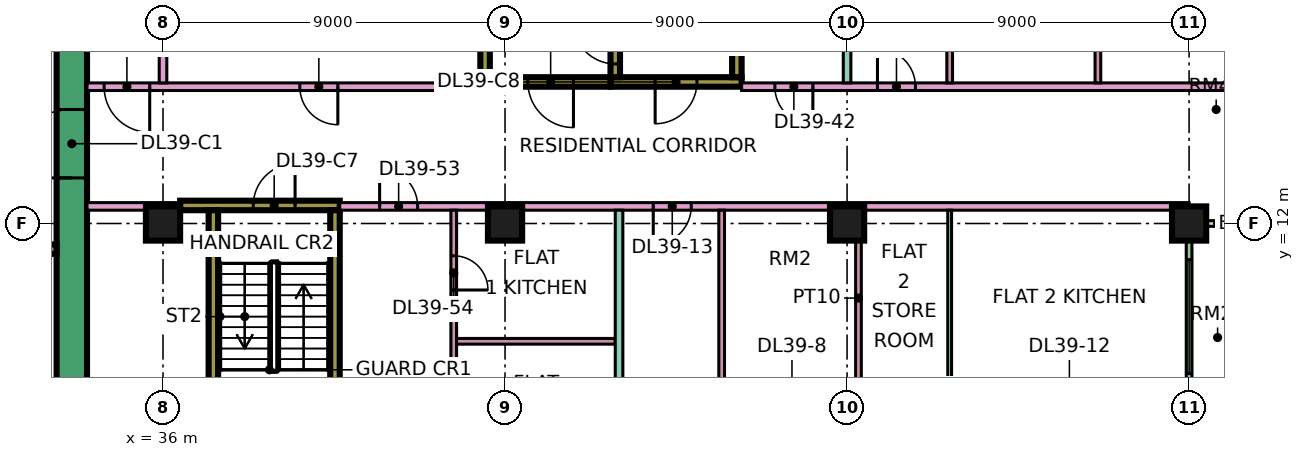
"""IFC4 building model, lengths in metres.
Left out: names, types, materials, properties, quantities, classifications, styles, units other than length and angle.
Written with IfcOpenShell. Run it as: python <this file> out.ifc"""

import sys

from ifc_helpers import new_model, si_unit, direction, frame, frame_2d, origin, origin_2d, place, context, subcontext, project, spatial, rectangle, extrude, element, fill, save


model = new_model("IFC4")
c1 = context("Model", 3, precision=1e-05, world=origin(), true_north=direction((0.0, 1.0)))
c2 = subcontext(c1, "Body", "Model", "MODEL_VIEW")
j1 = project(units=[si_unit("LENGTHUNIT", "METRE"), si_unit("PLANEANGLEUNIT", "RADIAN")], contexts=[c1])
p1 = place(None, origin())
s1 = spatial("IfcSite", under=j1, at=p1, CompositionType="ELEMENT")
p2 = place(p1, origin())
s2 = spatial("IfcBuilding", under=s1, at=p2, CompositionType="ELEMENT")
p3 = place(p2, frame((0.0, 0.0, 172.4)))
s3 = spatial("IfcBuildingStorey", under=s2, at=p3, CompositionType="ELEMENT", Elevation=172.4)
for number, where, z_axis, x_axis in (
    (1, (36.0, 12.0, 0.0), (0.0, 0.0, 1.0), (1.0, 0.0, 0.0)),
    (2, (45.0, 12.0, 0.0), (0.0, 0.0, 1.0), (1.0, 0.0, 0.0)),
    (3, (54.0, 12.0, 0.0), (0.0, 0.0, 1.0), (1.0, 0.0, 0.0)),
    (4, (63.0, 12.0, 0.0), (0.0, 0.0, 1.0), (1.0, 0.0, 0.0)),
):
    element("IfcColumn", number, at=place(p3, frame(where, z_axis=z_axis, x_axis=x_axis)), inside=s3, PredefinedType="COLUMN", context=c2, shape_type="SweptSolid", body=[
        extrude(rectangle(XDim=0.9, YDim=0.9, at=origin_2d()), origin(), (0.0, 0.0, 1.0), 3.75),
    ])
p4 = place(p3, frame((33.6, 7.8, 0.0), z_axis=(0.0, 0.0, 1.0), x_axis=(0.0, 1.0, 0.0)))
e5 = element("IfcWall", 5, at=p4, inside=s3, PredefinedType="SHEAR", context=c2, shape_type="SweptSolid", body=[
    extrude(rectangle(XDim=11.4, YDim=0.8, at=frame_2d((5.7, 0.0))), origin(), (0.0, 0.0, 1.0), 3.75),
])
p5 = place(p4, frame((5.4, 0.0, 0.0)))
e6 = element("IfcOpeningElement", 6, at=p5, cuts=e5, PredefinedType="OPENING", context=c2, shape_type="SweptSolid", body=[
    extrude(rectangle(XDim=1.8, YDim=2.4, at=frame_2d((0.9, 1.2))), frame((0.0, 0.41, 0.0), z_axis=(0.0, -1.0, 0.0), x_axis=(1.0, 0.0, 0.0)), (0.0, 0.0, 1.0), 0.82),
])
p6 = place(p3, frame((13.45, 11.325, 0.0), z_axis=(0.0, 0.0, 1.0), x_axis=(1.0, 0.0, 0.0)))
e7 = element("IfcWall", 7, at=p6, inside=s3, PredefinedType="SHEAR", context=c2, shape_type="SweptSolid", body=[
    extrude(rectangle(XDim=19.75, YDim=0.25, at=frame_2d((9.875, 0.0))), origin(), (0.0, 0.0, 1.0), 3.75),
])
p7 = place(p6, frame((11.65, 0.0, 0.0)))
e8 = element("IfcOpeningElement", 8, at=p7, cuts=e7, PredefinedType="OPENING", context=c2, shape_type="SweptSolid", body=[
    extrude(rectangle(XDim=1.2, YDim=2.2, at=frame_2d((0.6, 1.1))), frame((0.0, 0.135, 0.0), z_axis=(0.0, -1.0, 0.0), x_axis=(1.0, 0.0, 0.0)), (0.0, 0.0, 1.0), 0.27),
])
p8 = place(p6, frame((14.4, 0.0, 0.0)))
e9 = element("IfcOpeningElement", 9, at=p8, cuts=e7, PredefinedType="OPENING", context=c2, shape_type="SweptSolid", body=[
    extrude(rectangle(XDim=1.2, YDim=2.2, at=frame_2d((0.6, 1.1))), frame((0.0, 0.135, 0.0), z_axis=(0.0, -1.0, 0.0), x_axis=(1.0, 0.0, 0.0)), (0.0, 0.0, 1.0), 0.27),
])
p9 = place(p6, frame((17.15, 0.0, 0.0)))
e10 = element("IfcOpeningElement", 10, at=p9, cuts=e7, PredefinedType="OPENING", context=c2, shape_type="SweptSolid", body=[
    extrude(rectangle(XDim=1.2, YDim=2.2, at=frame_2d((0.6, 1.1))), frame((0.0, 0.135, 0.0), z_axis=(0.0, -1.0, 0.0), x_axis=(1.0, 0.0, 0.0)), (0.0, 0.0, 1.0), 0.27),
])
p10 = place(p6, frame((2.8, 0.0, 0.0)))
e11 = element("IfcOpeningElement", 11, at=p10, cuts=e7, PredefinedType="OPENING", context=c2, shape_type="SweptSolid", body=[
    extrude(rectangle(XDim=0.9, YDim=2.1, at=frame_2d((0.45, 1.05))), frame((0.0, 0.135, 0.0), z_axis=(0.0, -1.0, 0.0), x_axis=(1.0, 0.0, 0.0)), (0.0, 0.0, 1.0), 0.27),
])
p11 = place(p6, frame((8.175, 0.0, 0.0)))
e12 = element("IfcOpeningElement", 12, at=p11, cuts=e7, PredefinedType="OPENING", context=c2, shape_type="SweptSolid", body=[
    extrude(rectangle(XDim=0.9, YDim=2.1, at=frame_2d((0.45, 1.05))), frame((0.0, 0.135, 0.0), z_axis=(0.0, -1.0, 0.0), x_axis=(1.0, 0.0, 0.0)), (0.0, 0.0, 1.0), 0.27),
])
p12 = place(p3, frame((36.45, 12.475, 0.0), z_axis=(0.0, 0.0, 1.0), x_axis=(1.0, 0.0, 0.0)))
e13 = element("IfcWall", 13, at=p12, inside=s3, PredefinedType="SHEAR", context=c2, shape_type="SweptSolid", body=[
    extrude(rectangle(XDim=4.2, YDim=0.25, at=frame_2d((2.1, 0.0))), origin(), (0.0, 0.0, 1.0), 3.75),
])
p13 = place(p12, frame((1.925, 0.0, 0.0)))
e14 = element("IfcOpeningElement", 14, at=p13, cuts=e13, PredefinedType="OPENING", context=c2, shape_type="SweptSolid", body=[
    extrude(rectangle(XDim=1.1, YDim=2.2, at=frame_2d((0.55, 1.1))), frame((0.0, 0.135, 0.0), z_axis=(0.0, -1.0, 0.0), x_axis=(1.0, 0.0, 0.0)), (0.0, 0.0, 1.0), 0.27),
])
for number, where, z_axis, x_axis in (
    (15, (37.325, 5.85, 0.0), (0.0, 0.0, 1.0), (0.0, 1.0, 0.0)),
    (16, (40.525, 5.85, 0.0), (0.0, 0.0, 1.0), (0.0, 1.0, 0.0)),
):
    element("IfcWall", number, at=place(p3, frame(where, z_axis=z_axis, x_axis=x_axis)), inside=s3, PredefinedType="SHEAR", context=c2, shape_type="SweptSolid", body=[
        extrude(rectangle(XDim=6.5, YDim=0.25, at=frame_2d((3.25, 0.0))), origin(), (0.0, 0.0, 1.0), 3.75),
    ])
p14 = place(p3, frame((47.775, 15.725, 0.0), z_axis=(0.0, 0.0, 1.0), x_axis=(1.0, 0.0, 0.0)))
e17 = element("IfcWall", 17, at=p14, inside=s3, PredefinedType="SHEAR", context=c2, shape_type="SweptSolid", body=[
    extrude(rectangle(XDim=3.45, YDim=0.25, at=frame_2d((1.725, 0.0))), origin(), (0.0, 0.0, 1.0), 3.75),
])
p15 = place(p14, frame((1.175, 0.0, 0.0)))
e18 = element("IfcOpeningElement", 18, at=p15, cuts=e17, PredefinedType="OPENING", context=c2, shape_type="SweptSolid", body=[
    extrude(rectangle(XDim=1.1, YDim=2.2, at=frame_2d((0.55, 1.1))), frame((0.0, 0.135, 0.0), z_axis=(0.0, -1.0, 0.0), x_axis=(1.0, 0.0, 0.0)), (0.0, 0.0, 1.0), 0.27),
])
p16 = place(p3, frame((47.9, 15.85, 0.0), z_axis=(0.0, 0.0, 1.0), x_axis=(0.0, 1.0, 0.0)))
e19 = element("IfcWall", 19, at=p16, inside=s3, PredefinedType="SHEAR", context=c2, shape_type="SweptSolid", body=[
    extrude(rectangle(XDim=6.5, YDim=0.25, at=frame_2d((3.25, 0.0))), origin(), (0.0, 0.0, 1.0), 3.75),
])
p17 = place(p16, frame((0.35, 0.0, 0.0)))
e20 = element("IfcOpeningElement", 20, at=p17, cuts=e19, PredefinedType="OPENING", context=c2, shape_type="SweptSolid", body=[
    extrude(rectangle(XDim=1.1, YDim=2.2, at=frame_2d((0.55, 1.1))), frame((0.0, 0.135, 0.0), z_axis=(0.0, -1.0, 0.0), x_axis=(1.0, 0.0, 0.0)), (0.0, 0.0, 1.0), 0.27),
])
p18 = place(p3, frame((51.1, 15.85, 0.0), z_axis=(0.0, 0.0, 1.0), x_axis=(0.0, 1.0, 0.0)))
e21 = element("IfcWall", 21, at=p18, inside=s3, PredefinedType="SHEAR", context=c2, shape_type="SweptSolid", body=[
    extrude(rectangle(XDim=6.5, YDim=0.25, at=frame_2d((3.25, 0.0))), origin(), (0.0, 0.0, 1.0), 3.75),
])
p19 = place(p3, frame((44.35, 15.725, 0.0), z_axis=(0.0, 0.0, 1.0), x_axis=(1.0, 0.0, 0.0)))
e22 = element("IfcWall", 22, at=p19, inside=s3, PredefinedType="SHEAR", context=c2, shape_type="SweptSolid", body=[
    extrude(rectangle(XDim=3.425, YDim=0.25, at=frame_2d((1.712, 0.0))), origin(), (0.0, 0.0, 1.0), 3.75),
])
p20 = place(p19, frame((1.25, 0.0, 0.0)))
e23 = element("IfcOpeningElement", 23, at=p20, cuts=e22, PredefinedType="OPENING", context=c2, shape_type="SweptSolid", body=[
    extrude(rectangle(XDim=1.2, YDim=2.2, at=frame_2d((0.6, 1.1))), frame((0.0, 0.135, 0.0), z_axis=(0.0, -1.0, 0.0), x_axis=(1.0, 0.0, 0.0)), (0.0, 0.0, 1.0), 0.27),
])
p21 = place(p3, frame((44.475, 15.85, 0.0), z_axis=(0.0, 0.0, 1.0), x_axis=(0.0, 1.0, 0.0)))
e24 = element("IfcWall", 24, at=p21, inside=s3, PredefinedType="SHEAR", context=c2, shape_type="SweptSolid", body=[
    extrude(rectangle(XDim=6.5, YDim=0.25, at=frame_2d((3.25, 0.0))), origin(), (0.0, 0.0, 1.0), 3.75),
])
p22 = place(p21, frame((1.75, 0.0, 0.0)))
e25 = element("IfcOpeningElement", 25, at=p22, cuts=e24, PredefinedType="OPENING", context=c2, shape_type="SweptSolid", body=[
    extrude(rectangle(XDim=1.1, YDim=2.2, at=frame_2d((0.55, 1.1))), frame((0.0, 0.135, 0.0), z_axis=(0.0, -1.0, 0.0), x_axis=(1.0, 0.0, 0.0)), (0.0, 0.0, 1.0), 0.27),
])
p23 = place(p21, frame((4.3, 0.0, 0.0)))
e26 = element("IfcOpeningElement", 26, at=p23, cuts=e24, PredefinedType="OPENING", context=c2, shape_type="SweptSolid", body=[
    extrude(rectangle(XDim=1.1, YDim=2.2, at=frame_2d((0.55, 1.1))), frame((0.0, 0.135, 0.0), z_axis=(0.0, -1.0, 0.0), x_axis=(1.0, 0.0, 0.0)), (0.0, 0.0, 1.0), 0.27),
])
p24 = place(p3, frame((63.0, 1.575, 0.0), z_axis=(0.0, 0.0, 1.0), x_axis=(0.0, 1.0, 0.0)))
e27 = element("IfcWall", 27, at=p24, inside=s3, PredefinedType="SOLIDWALL", context=c2, shape_type="SweptSolid", body=[
    extrude(rectangle(XDim=10.35, YDim=0.15, at=frame_2d((5.175, 0.0))), origin(), (0.0, 0.0, 1.0), 3.35),
])
p25 = place(p24, frame((2.137, 0.0, 0.0)))
e28 = element("IfcOpeningElement", 28, at=p25, cuts=e27, PredefinedType="OPENING", context=c2, shape_type="SweptSolid", body=[
    extrude(rectangle(XDim=1.8, YDim=2.4, at=frame_2d((0.9, 1.2))), frame((0.0, 0.085, 0.0), z_axis=(0.0, -1.0, 0.0), x_axis=(1.0, 0.0, 0.0)), (0.0, 0.0, 1.0), 0.17),
])
p26 = place(p24, frame((6.475, 0.0, 0.45)))
e29 = element("IfcOpeningElement", 29, at=p26, cuts=e27, PredefinedType="OPENING", context=c2, shape_type="SweptSolid", body=[
    extrude(rectangle(XDim=3.0, YDim=2.4, at=frame_2d((1.5, 1.2))), frame((0.0, 0.085, 0.0), z_axis=(0.0, -1.0, 0.0), x_axis=(1.0, 0.0, 0.0)), (0.0, 0.0, 1.0), 0.17),
])
p27 = place(p3, frame((64.5, 12.0, 0.0), z_axis=(0.0, 0.0, 1.0), x_axis=(-1.0, 0.0, 0.0)))
e30 = element("IfcWall", 30, at=p27, inside=s3, PredefinedType="SOLIDWALL", context=c2, shape_type="SweptSolid", body=[
    extrude(rectangle(XDim=1.5, YDim=0.15, at=frame_2d((0.75, 0.0))), origin(), (0.0, 0.0, 1.0), 3.35),
])
p28 = place(p3, frame((34.0, 12.45, 0.0), z_axis=(0.0, 0.0, 1.0), x_axis=(1.0, 0.0, 0.0)))
e31 = element("IfcWall", 31, at=p28, inside=s3, PredefinedType="PARTITIONING", context=c2, shape_type="SweptSolid", body=[
    extrude(rectangle(XDim=2.451, YDim=0.2, at=frame_2d((1.226, 0.0))), origin(), (0.0, 0.0, 1.0), 3.35),
])
p29 = place(p3, frame((34.0, 15.6, 0.0), z_axis=(0.0, 0.0, 1.0), x_axis=(1.0, 0.0, 0.0)))
e32 = element("IfcWall", 32, at=p29, inside=s3, PredefinedType="PARTITIONING", context=c2, shape_type="SweptSolid", body=[
    extrude(rectangle(XDim=10.35, YDim=0.2, at=frame_2d((5.175, 0.0))), origin(), (0.0, 0.0, 1.0), 3.35),
])
p30 = place(p29, frame((5.6, 0.0, 0.0)))
e33 = element("IfcOpeningElement", 33, at=p30, cuts=e32, PredefinedType="OPENING", context=c2, shape_type="SweptSolid", body=[
    extrude(rectangle(XDim=1.0, YDim=2.1, at=frame_2d((0.5, 1.05))), frame((0.0, 0.11, 0.0), z_axis=(0.0, -1.0, 0.0), x_axis=(1.0, 0.0, 0.0)), (0.0, 0.0, 1.0), 0.22),
])
p31 = place(p29, frame((0.45, 0.0, 0.0)))
e34 = element("IfcOpeningElement", 34, at=p31, cuts=e32, PredefinedType="OPENING", context=c2, shape_type="SweptSolid", body=[
    extrude(rectangle(XDim=1.2, YDim=2.1, at=frame_2d((0.6, 1.05))), frame((0.0, 0.11, 0.0), z_axis=(0.0, -1.0, 0.0), x_axis=(1.0, 0.0, 0.0)), (0.0, 0.0, 1.0), 0.22),
])
p32 = place(p3, frame((36.0, 15.7, 0.0), z_axis=(0.0, 0.0, 1.0), x_axis=(0.0, 1.0, 0.0)))
e35 = element("IfcWall", 35, at=p32, inside=s3, PredefinedType="PARTITIONING", context=c2, shape_type="SweptSolid", body=[
    extrude(rectangle(XDim=8.3, YDim=0.2, at=frame_2d((4.15, 0.0))), origin(), (0.0, 0.0, 1.0), 3.35),
])
p33 = place(p3, frame((40.65, 12.45, 0.0), z_axis=(0.0, 0.0, 1.0), x_axis=(1.0, 0.0, 0.0)))
e36 = element("IfcWall", 36, at=p33, inside=s3, PredefinedType="PARTITIONING", context=c2, shape_type="SweptSolid", body=[
    extrude(rectangle(XDim=22.35, YDim=0.2, at=frame_2d((11.175, 0.0))), origin(), (0.0, 0.0, 1.0), 3.35),
])
p34 = place(p33, frame((8.25, 0.0, 0.0)))
e37 = element("IfcOpeningElement", 37, at=p34, cuts=e36, PredefinedType="OPENING", context=c2, shape_type="SweptSolid", body=[
    extrude(rectangle(XDim=1.0, YDim=2.1, at=frame_2d((0.5, 1.05))), frame((0.0, 0.11, 0.0), z_axis=(0.0, -1.0, 0.0), x_axis=(1.0, 0.0, 0.0)), (0.0, 0.0, 1.0), 0.22),
])
p35 = place(p33, frame((1.05, 0.0, 0.0)))
e38 = element("IfcOpeningElement", 38, at=p35, cuts=e36, PredefinedType="OPENING", context=c2, shape_type="SweptSolid", body=[
    extrude(rectangle(XDim=1.0, YDim=2.1, at=frame_2d((0.5, 1.05))), frame((0.0, 0.11, 0.0), z_axis=(0.0, -1.0, 0.0), x_axis=(1.0, 0.0, 0.0)), (0.0, 0.0, 1.0), 0.22),
])
p36 = place(p3, frame((43.65, 5.825, 0.0), z_axis=(0.0, 0.0, 1.0), x_axis=(0.0, 1.0, 0.0)))
e39 = element("IfcWall", 39, at=p36, inside=s3, PredefinedType="PARTITIONING", context=c2, shape_type="SweptSolid", body=[
    extrude(rectangle(XDim=6.525, YDim=0.15, at=frame_2d((3.263, 0.0))), origin(), (0.0, 0.0, 1.0), 3.35),
])
p37 = place(p36, frame((4.425, 0.0, 0.0)))
e40 = element("IfcOpeningElement", 40, at=p37, cuts=e39, PredefinedType="OPENING", context=c2, shape_type="SweptSolid", body=[
    extrude(rectangle(XDim=0.9, YDim=2.1, at=frame_2d((0.45, 1.05))), frame((0.0, 0.085, 0.0), z_axis=(0.0, -1.0, 0.0), x_axis=(1.0, 0.0, 0.0)), (0.0, 0.0, 1.0), 0.17),
])
p38 = place(p3, frame((43.725, 8.9, 0.0), z_axis=(0.0, 0.0, 1.0), x_axis=(1.0, 0.0, 0.0)))
e41 = element("IfcWall", 41, at=p38, inside=s3, PredefinedType="PARTITIONING", context=c2, shape_type="SweptSolid", body=[
    extrude(rectangle(XDim=4.175, YDim=0.15, at=frame_2d((2.087, 0.0))), origin(), (0.0, 0.0, 1.0), 3.35),
])
p39 = place(p3, frame((48.0, 0.0, 0.0), z_axis=(0.0, 0.0, 1.0), x_axis=(0.0, 1.0, 0.0)))
e42 = element("IfcWall", 42, at=p39, inside=s3, PredefinedType="PARTITIONING", context=c2, shape_type="SweptSolid", body=[
    extrude(rectangle(XDim=12.35, YDim=0.2, at=frame_2d((6.175, 0.0))), origin(), (0.0, 0.0, 1.0), 3.35),
])
p40 = place(p3, frame((50.7, 7.725, 0.0), z_axis=(0.0, 0.0, 1.0), x_axis=(0.0, 1.0, 0.0)))
e43 = element("IfcWall", 43, at=p40, inside=s3, PredefinedType="PARTITIONING", context=c2, shape_type="SweptSolid", body=[
    extrude(rectangle(XDim=4.625, YDim=0.15, at=frame_2d((2.312, 0.0))), origin(), (0.0, 0.0, 1.0), 3.35),
])
p41 = place(p3, frame((51.225, 15.6, 0.0), z_axis=(0.0, 0.0, 1.0), x_axis=(1.0, 0.0, 0.0)))
e44 = element("IfcWall", 44, at=p41, inside=s3, PredefinedType="PARTITIONING", context=c2, shape_type="SweptSolid", body=[
    extrude(rectangle(XDim=13.125, YDim=0.2, at=frame_2d((6.562, 0.0))), origin(), (0.0, 0.0, 1.0), 3.35),
])
p42 = place(p41, frame((3.575, 0.0, 0.0)))
e45 = element("IfcOpeningElement", 45, at=p42, cuts=e44, PredefinedType="OPENING", context=c2, shape_type="SweptSolid", body=[
    extrude(rectangle(XDim=1.0, YDim=2.1, at=frame_2d((0.5, 1.05))), frame((0.0, 0.11, 0.0), z_axis=(0.0, -1.0, 0.0), x_axis=(1.0, 0.0, 0.0)), (0.0, 0.0, 1.0), 0.22),
])
p43 = place(p41, frame((0.875, 0.0, 0.0)))
e46 = element("IfcOpeningElement", 46, at=p43, cuts=e44, PredefinedType="OPENING", context=c2, shape_type="SweptSolid", body=[
    extrude(rectangle(XDim=1.0, YDim=2.1, at=frame_2d((0.5, 1.05))), frame((0.0, 0.11, 0.0), z_axis=(0.0, -1.0, 0.0), x_axis=(1.0, 0.0, 0.0)), (0.0, 0.0, 1.0), 0.22),
])
p44 = place(p3, frame((54.0, 15.7, 0.0), z_axis=(0.0, 0.0, 1.0), x_axis=(0.0, 1.0, 0.0)))
e47 = element("IfcWall", 47, at=p44, inside=s3, PredefinedType="PARTITIONING", context=c2, shape_type="SweptSolid", body=[
    extrude(rectangle(XDim=8.226, YDim=0.2, at=frame_2d((4.113, 0.0))), origin(), (0.0, 0.0, 1.0), 3.35),
])
p45 = place(p3, frame((54.3, 7.725, 0.0), z_axis=(0.0, 0.0, 1.0), x_axis=(0.0, 1.0, 0.0)))
e48 = element("IfcWall", 48, at=p45, inside=s3, PredefinedType="PARTITIONING", context=c2, shape_type="SweptSolid", body=[
    extrude(rectangle(XDim=4.625, YDim=0.15, at=frame_2d((2.312, 0.0))), origin(), (0.0, 0.0, 1.0), 3.35),
])
p46 = place(p3, frame((56.7, 7.725, 0.0), z_axis=(0.0, 0.0, 1.0), x_axis=(0.0, 1.0, 0.0)))
e49 = element("IfcWall", 49, at=p46, inside=s3, PredefinedType="PARTITIONING", context=c2, shape_type="SweptSolid", body=[
    extrude(rectangle(XDim=4.625, YDim=0.1, at=frame_2d((2.312, 0.0))), origin(), (0.0, 0.0, 1.0), 3.35),
])
for number, where, z_axis, x_axis in (
    (50, (56.7, 15.7, 0.0), (0.0, 0.0, 1.0), (0.0, 1.0, 0.0)),
    (51, (60.6, 15.7, 0.0), (0.0, 0.0, 1.0), (0.0, 1.0, 0.0)),
):
    element("IfcWall", number, at=place(p3, frame(where, z_axis=z_axis, x_axis=x_axis)), inside=s3, PredefinedType="PARTITIONING", context=c2, shape_type="SweptSolid", body=[
        extrude(rectangle(XDim=2.825, YDim=0.15, at=frame_2d((1.413, 0.0))), origin(), (0.0, 0.0, 1.0), 3.35),
    ])
p47 = place(p26, origin())
e52 = element("IfcWindow", 52, at=p47, inside=s3, PartitioningType="SINGLE_PANEL", PredefinedType="WINDOW", context=c2, shape_type="SweptSolid", body=[
    extrude(rectangle(XDim=3.0, YDim=2.4, at=frame_2d((1.5, 1.2))), frame((0.0, 0.03, 0.0), z_axis=(0.0, -1.0, 0.0), x_axis=(1.0, 0.0, 0.0)), (0.0, 0.0, 1.0), 0.06),
])
fill(e29, e52)
p48 = place(p5, origin())
e53 = element("IfcDoor", 53, at=p48, inside=s3, OperationType="DOUBLE_DOOR_SINGLE_SWING", PredefinedType="DOOR", context=c2, shape_type="SweptSolid", body=[
    extrude(rectangle(XDim=1.8, YDim=2.4, at=frame_2d((0.9, 1.2))), frame((0.0, 0.025, 0.0), z_axis=(0.0, -1.0, 0.0), x_axis=(1.0, 0.0, 0.0)), (0.0, 0.0, 1.0), 0.05),
])
fill(e6, e53)
p49 = place(p13, frame((1.1, 0.0, 0.0), z_axis=(0.0, 0.0, 1.0), x_axis=(-1.0, 0.0, 0.0)))
e54 = element("IfcDoor", 54, at=p49, inside=s3, OperationType="SINGLE_SWING_RIGHT", PredefinedType="DOOR", context=c2, shape_type="SweptSolid", body=[
    extrude(rectangle(XDim=1.1, YDim=2.2, at=frame_2d((0.55, 1.1))), frame((0.0, 0.025, 0.0), z_axis=(0.0, -1.0, 0.0), x_axis=(1.0, 0.0, 0.0)), (0.0, 0.0, 1.0), 0.05),
])
fill(e14, e54)
p50 = place(p15, frame((1.1, 0.0, 0.0), z_axis=(0.0, 0.0, 1.0), x_axis=(-1.0, 0.0, 0.0)))
e55 = element("IfcDoor", 55, at=p50, inside=s3, OperationType="SINGLE_SWING_LEFT", PredefinedType="DOOR", context=c2, shape_type="SweptSolid", body=[
    extrude(rectangle(XDim=1.1, YDim=2.2, at=frame_2d((0.55, 1.1))), frame((0.0, 0.025, 0.0), z_axis=(0.0, -1.0, 0.0), x_axis=(1.0, 0.0, 0.0)), (0.0, 0.0, 1.0), 0.05),
])
fill(e18, e55)
p51 = place(p20, origin())
e56 = element("IfcDoor", 56, at=p51, inside=s3, OperationType="SINGLE_SWING_RIGHT", PredefinedType="DOOR", context=c2, shape_type="SweptSolid", body=[
    extrude(rectangle(XDim=1.2, YDim=2.2, at=frame_2d((0.6, 1.1))), frame((0.0, 0.025, 0.0), z_axis=(0.0, -1.0, 0.0), x_axis=(1.0, 0.0, 0.0)), (0.0, 0.0, 1.0), 0.05),
])
fill(e23, e56)
p52 = place(p17, frame((1.1, 0.0, 0.0), z_axis=(0.0, 0.0, 1.0), x_axis=(-1.0, 0.0, 0.0)))
e57 = element("IfcDoor", 57, at=p52, inside=s3, OperationType="SINGLE_SWING_RIGHT", PredefinedType="DOOR", context=c2, shape_type="SweptSolid", body=[
    extrude(rectangle(XDim=1.1, YDim=2.2, at=frame_2d((0.55, 1.1))), frame((0.0, 0.025, 0.0), z_axis=(0.0, -1.0, 0.0), x_axis=(1.0, 0.0, 0.0)), (0.0, 0.0, 1.0), 0.05),
])
fill(e20, e57)
p53 = place(p30, origin())
e58 = element("IfcDoor", 58, at=p53, inside=s3, OperationType="SINGLE_SWING_RIGHT", PredefinedType="DOOR", context=c2, shape_type="SweptSolid", body=[
    extrude(rectangle(XDim=1.0, YDim=2.1, at=frame_2d((0.5, 1.05))), frame((0.0, 0.025, 0.0), z_axis=(0.0, -1.0, 0.0), x_axis=(1.0, 0.0, 0.0)), (0.0, 0.0, 1.0), 0.05),
])
fill(e33, e58)
p54 = place(p42, origin())
e59 = element("IfcDoor", 59, at=p54, inside=s3, OperationType="SINGLE_SWING_LEFT", PredefinedType="DOOR", context=c2, shape_type="SweptSolid", body=[
    extrude(rectangle(XDim=1.0, YDim=2.1, at=frame_2d((0.5, 1.05))), frame((0.0, 0.025, 0.0), z_axis=(0.0, -1.0, 0.0), x_axis=(1.0, 0.0, 0.0)), (0.0, 0.0, 1.0), 0.05),
])
fill(e45, e59)
p55 = place(p34, frame((1.0, 0.0, 0.0), z_axis=(0.0, 0.0, 1.0), x_axis=(-1.0, 0.0, 0.0)))
e60 = element("IfcDoor", 60, at=p55, inside=s3, OperationType="SINGLE_SWING_LEFT", PredefinedType="DOOR", context=c2, shape_type="SweptSolid", body=[
    extrude(rectangle(XDim=1.0, YDim=2.1, at=frame_2d((0.5, 1.05))), frame((0.0, 0.025, 0.0), z_axis=(0.0, -1.0, 0.0), x_axis=(1.0, 0.0, 0.0)), (0.0, 0.0, 1.0), 0.05),
])
fill(e37, e60)
p56 = place(p31, origin())
e61 = element("IfcDoor", 61, at=p56, inside=s3, OperationType="SINGLE_SWING_RIGHT", PredefinedType="DOOR", context=c2, shape_type="SweptSolid", body=[
    extrude(rectangle(XDim=1.2, YDim=2.1, at=frame_2d((0.6, 1.05))), frame((0.0, 0.025, 0.0), z_axis=(0.0, -1.0, 0.0), x_axis=(1.0, 0.0, 0.0)), (0.0, 0.0, 1.0), 0.05),
])
fill(e34, e61)
p57 = place(p43, origin())
e62 = element("IfcDoor", 62, at=p57, inside=s3, OperationType="SINGLE_SWING_RIGHT", PredefinedType="DOOR", context=c2, shape_type="SweptSolid", body=[
    extrude(rectangle(XDim=1.0, YDim=2.1, at=frame_2d((0.5, 1.05))), frame((0.0, 0.025, 0.0), z_axis=(0.0, -1.0, 0.0), x_axis=(1.0, 0.0, 0.0)), (0.0, 0.0, 1.0), 0.05),
])
fill(e46, e62)
p58 = place(p35, origin())
e63 = element("IfcDoor", 63, at=p58, inside=s3, OperationType="SINGLE_SWING_LEFT", PredefinedType="DOOR", context=c2, shape_type="SweptSolid", body=[
    extrude(rectangle(XDim=1.0, YDim=2.1, at=frame_2d((0.5, 1.05))), frame((0.0, 0.025, 0.0), z_axis=(0.0, -1.0, 0.0), x_axis=(1.0, 0.0, 0.0)), (0.0, 0.0, 1.0), 0.05),
])
fill(e38, e63)
p59 = place(p37, frame((0.9, 0.0, 0.0), z_axis=(0.0, 0.0, 1.0), x_axis=(-1.0, 0.0, 0.0)))
e64 = element("IfcDoor", 64, at=p59, inside=s3, OperationType="SINGLE_SWING_LEFT", PredefinedType="DOOR", context=c2, shape_type="SweptSolid", body=[
    extrude(rectangle(XDim=0.9, YDim=2.1, at=frame_2d((0.45, 1.05))), frame((0.0, 0.025, 0.0), z_axis=(0.0, -1.0, 0.0), x_axis=(1.0, 0.0, 0.0)), (0.0, 0.0, 1.0), 0.05),
])
fill(e40, e64)
save(model, sys.argv[1])
